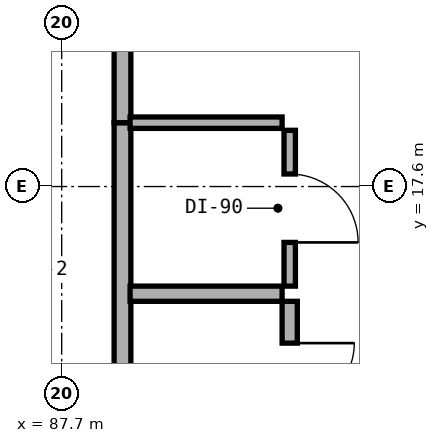
"""IFC4 building model, lengths in metres.
Left out: names, types, materials, properties, quantities, classifications, styles, units other than length and angle.
Written with IfcOpenShell. Run it as: python <this file> out.ifc"""

import sys

from ifc_helpers import new_model, si_unit, direction, frame, frame_2d, origin, place, context, subcontext, project, spatial, rectangle, extrude, element, fill, save


model = new_model("IFC4")
c1 = context("Model", 3, precision=1e-05, world=origin(), true_north=direction((0.0, 1.0)))
c2 = subcontext(c1, "Body", "Model", "MODEL_VIEW")
j1 = project(units=[si_unit("LENGTHUNIT", "METRE"), si_unit("PLANEANGLEUNIT", "RADIAN")], contexts=[c1])
p1 = place(None, origin())
s1 = spatial("IfcSite", under=j1, at=p1, CompositionType="ELEMENT")
p2 = place(p1, origin())
s2 = spatial("IfcBuilding", under=s1, at=p2, CompositionType="ELEMENT")
p3 = place(p2, frame((0.0, 0.0, 41.5)))
s3 = spatial("IfcBuildingStorey", under=s2, at=p3, CompositionType="ELEMENT", Elevation=41.5)
p4 = place(p3, frame((88.5, 14.04, 0.0), z_axis=(0.0, 0.0, 1.0), x_axis=(0.0, 1.0, 0.0)))
e1 = element("IfcWall", 1, at=p4, inside=s3, PredefinedType="SOLIDWALL", context=c2, shape_type="SweptSolid", body=[
    extrude(rectangle(XDim=4.4, YDim=0.22, at=frame_2d((2.2, 0.0))), origin(), (0.0, 0.0, 1.0), 3.22),
])
p5 = place(p3, frame((88.5, 18.44, 0.0), z_axis=(0.0, 0.0, 1.0), x_axis=(0.0, 1.0, 0.0)))
e2 = element("IfcWall", 2, at=p5, inside=s3, PredefinedType="SOLIDWALL", context=c2, shape_type="SweptSolid", body=[
    extrude(rectangle(XDim=3.56, YDim=0.22, at=frame_2d((1.78, 0.0))), origin(), (0.0, 0.0, 1.0), 2.725),
])
p6 = place(p5, frame((1.305, 0.0, 0.0)))
e3 = element("IfcOpeningElement", 3, at=p6, cuts=e2, PredefinedType="OPENING", context=c2, shape_type="SweptSolid", body=[
    extrude(rectangle(XDim=0.95, YDim=2.1, at=frame_2d((0.475, 1.05))), frame((0.0, 0.12, 0.0), z_axis=(0.0, -1.0, 0.0), x_axis=(1.0, 0.0, 0.0)), (0.0, 0.0, 1.0), 0.24),
])
p7 = place(p3, frame((88.6, 16.19, 0.0), z_axis=(0.0, 0.0, 1.0), x_axis=(1.0, 0.0, 0.0)))
e4 = element("IfcWall", 4, at=p7, inside=s3, PredefinedType="PLUMBINGWALL", context=c2, shape_type="SweptSolid", body=[
    extrude(rectangle(XDim=2.0, YDim=0.2, at=frame_2d((1.0, 0.0))), origin(), (0.0, 0.0, 1.0), 3.22),
])
p8 = place(p3, frame((88.6, 18.44, 0.0), z_axis=(0.0, 0.0, 1.0), x_axis=(1.0, 0.0, 0.0)))
e5 = element("IfcWall", 5, at=p8, inside=s3, PredefinedType="PARTITIONING", context=c2, shape_type="SweptSolid", body=[
    extrude(rectangle(XDim=2.0, YDim=0.15, at=frame_2d((1.0, 0.0))), origin(), (0.0, 0.0, 1.0), 3.22),
])
p9 = place(p3, frame((90.7, 14.14, 0.0), z_axis=(0.0, 0.0, 1.0), x_axis=(0.0, 1.0, 0.0)))
e6 = element("IfcWall", 6, at=p9, inside=s3, PredefinedType="PLUMBINGWALL", context=c2, shape_type="SweptSolid", body=[
    extrude(rectangle(XDim=1.95, YDim=0.2, at=frame_2d((0.975, 0.0))), origin(), (0.0, 0.0, 1.0), 3.22),
])
p10 = place(p9, frame((0.55, 0.0, 0.0)))
e7 = element("IfcOpeningElement", 7, at=p10, cuts=e6, PredefinedType="OPENING", context=c2, shape_type="SweptSolid", body=[
    extrude(rectangle(XDim=0.85, YDim=2.1, at=frame_2d((0.425, 1.05))), frame((0.0, 0.11, 0.0), z_axis=(0.0, -1.0, 0.0), x_axis=(1.0, 0.0, 0.0)), (0.0, 0.0, 1.0), 0.22),
])
p11 = place(p3, frame((90.7, 16.29, 0.0), z_axis=(0.0, 0.0, 1.0), x_axis=(0.0, 1.0, 0.0)))
e8 = element("IfcWall", 8, at=p11, inside=s3, PredefinedType="PARTITIONING", context=c2, shape_type="SweptSolid", body=[
    extrude(rectangle(XDim=2.05, YDim=0.15, at=frame_2d((1.025, 0.0))), origin(), (0.0, 0.0, 1.0), 3.22),
])
p12 = place(p11, frame((0.575, 0.0, 0.0)))
e9 = element("IfcOpeningElement", 9, at=p12, cuts=e8, PredefinedType="OPENING", context=c2, shape_type="SweptSolid", body=[
    extrude(rectangle(XDim=0.9, YDim=2.1, at=frame_2d((0.45, 1.05))), frame((0.0, 0.085, 0.0), z_axis=(0.0, -1.0, 0.0), x_axis=(1.0, 0.0, 0.0)), (0.0, 0.0, 1.0), 0.17),
])
p13 = place(p10, frame((0.85, 0.0, 0.0), z_axis=(0.0, 0.0, 1.0), x_axis=(-1.0, 0.0, 0.0)))
e10 = element("IfcDoor", 10, at=p13, inside=s3, OperationType="SINGLE_SWING_LEFT", PredefinedType="DOOR", context=c2, shape_type="SweptSolid", body=[
    extrude(rectangle(XDim=0.85, YDim=2.1, at=frame_2d((0.425, 1.05))), frame((0.0, 0.025, 0.0), z_axis=(0.0, -1.0, 0.0), x_axis=(1.0, 0.0, 0.0)), (0.0, 0.0, 1.0), 0.05),
])
fill(e7, e10)
p14 = place(p12, frame((0.9, 0.0, 0.0), z_axis=(0.0, 0.0, 1.0), x_axis=(-1.0, 0.0, 0.0)))
e11 = element("IfcDoor", 11, at=p14, inside=s3, OperationType="SINGLE_SWING_RIGHT", PredefinedType="DOOR", context=c2, shape_type="SweptSolid", body=[
    extrude(rectangle(XDim=0.9, YDim=2.1, at=frame_2d((0.45, 1.05))), frame((0.0, 0.025, 0.0), z_axis=(0.0, -1.0, 0.0), x_axis=(1.0, 0.0, 0.0)), (0.0, 0.0, 1.0), 0.05),
])
fill(e9, e11)
save(model, sys.argv[1])
